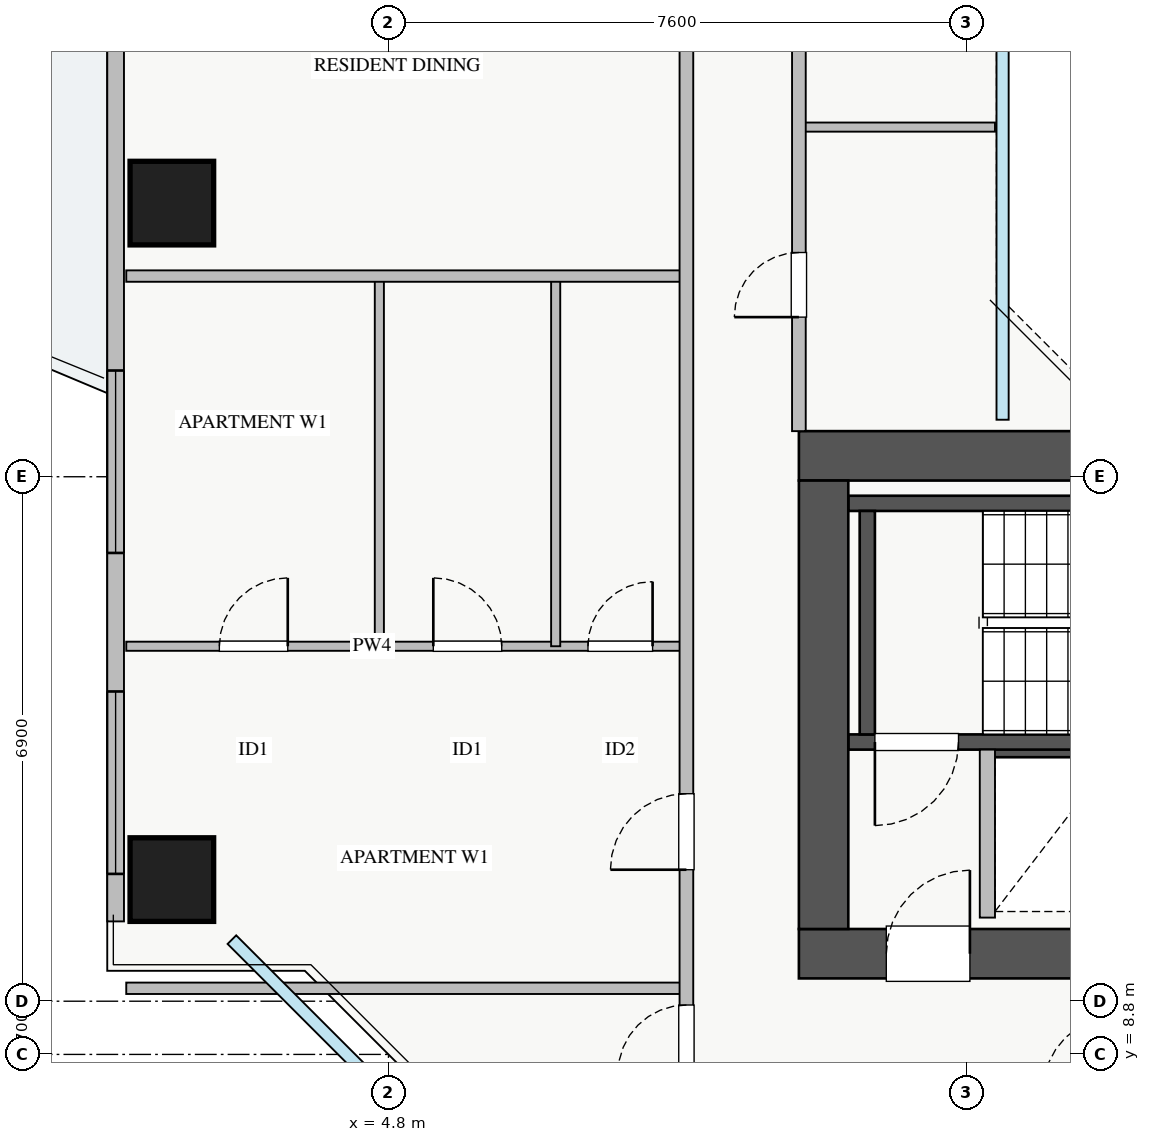
"""IFC4 building model, lengths in metres.
Left out: names, types, materials, properties, quantities, classifications, styles, units other than length and angle.
Written with IfcOpenShell. Run it as: python <this file> out.ifc"""

import sys

from ifc_helpers import new_model, si_unit, direction, frame, frame_2d, origin, origin_2d, place, context, subcontext, project, spatial, rectangle, extrude, source, transform, mapped, element, fill, save


model = new_model("IFC4")
c1 = context("Model", 3, precision=1e-05, world=origin(), true_north=direction((0.0, 1.0)))
c2 = subcontext(c1, "Body", "Model", "MODEL_VIEW")
j1 = project(units=[si_unit("LENGTHUNIT", "METRE"), si_unit("PLANEANGLEUNIT", "RADIAN")], contexts=[c1])
p1 = place(None, origin())
s1 = spatial("IfcSite", under=j1, at=p1, CompositionType="ELEMENT")
p2 = place(p1, origin())
s2 = spatial("IfcBuilding", under=s1, at=p2, CompositionType="ELEMENT")
p3 = place(p2, frame((0.0, 0.0, 123.0)))
s3 = spatial("IfcBuildingStorey", under=s2, at=p3, CompositionType="ELEMENT", Elevation=123.0)
p4 = place(p3, frame((12.68, 12.8, 0.0), z_axis=(0.0, 0.0, 1.0), x_axis=(1.0, 0.0, 0.0)))
e1 = element("IfcWall", 1, at=p4, inside=s3, PredefinedType="SHEAR", context=c2, shape_type="SweptSolid", body=[
    extrude(rectangle(XDim=1.94, YDim=0.18, at=frame_2d((0.97, 0.0))), origin(), (0.0, 0.0, 1.0), 3.07),
])
p5 = place(p3, frame((10.85, 12.91, 0.0), z_axis=(0.0, 0.0, 1.0), x_axis=(1.0, 0.0, 0.0)))
e2 = element("IfcWall", 2, at=p5, inside=s3, PredefinedType="SHEAR", context=c2, shape_type="SweptSolid", body=[
    extrude(rectangle(XDim=7.3, YDim=0.2, at=frame_2d((3.65, 0.0))), origin(), (0.0, 0.0, 1.0), 3.25),
])
p6 = place(p5, frame((0.35, 0.0, 0.0)))
e3 = element("IfcOpeningElement", 3, at=p6, cuts=e2, PredefinedType="OPENING", context=c2, shape_type="SweptSolid", body=[
    extrude(rectangle(XDim=1.1, YDim=2.05, at=frame_2d((0.55, 1.025))), frame((0.0, 0.11, 0.0), z_axis=(0.0, -1.0, 0.0), x_axis=(1.0, 0.0, 0.0)), (0.0, 0.0, 1.0), 0.22),
])
p7 = place(p3, frame((10.85, 16.05, 0.0), z_axis=(0.0, 0.0, 1.0), x_axis=(1.0, 0.0, 0.0)))
e4 = element("IfcWall", 4, at=p7, inside=s3, PredefinedType="SHEAR", context=c2, shape_type="SweptSolid", body=[
    extrude(rectangle(XDim=7.3, YDim=0.2, at=frame_2d((3.65, 0.0))), origin(), (0.0, 0.0, 1.0), 3.25),
])
p8 = place(p3, frame((11.1, 13.01, 0.0), z_axis=(0.0, 0.0, 1.0), x_axis=(0.0, 1.0, 0.0)))
e5 = element("IfcWall", 5, at=p8, inside=s3, PredefinedType="SHEAR", context=c2, shape_type="SweptSolid", body=[
    extrude(rectangle(XDim=2.94, YDim=0.2, at=frame_2d((1.47, 0.0))), origin(), (0.0, 0.0, 1.0), 3.25),
])
p9 = place(p3, frame((10.2, 10.125, 0.0), z_axis=(0.0, 0.0, 1.0), x_axis=(1.0, 0.0, 0.0)))
e6 = element("IfcWall", 6, at=p9, inside=s3, PredefinedType="SHEAR", context=c2, shape_type="SweptSolid", body=[
    extrude(rectangle(XDim=17.6, YDim=0.65, at=frame_2d((8.8, 0.0))), origin(), (0.0, 0.0, 1.0), 3.25),
])
p10 = place(p9, frame((1.15, 0.0, 0.0)))
e7 = element("IfcOpeningElement", 7, at=p10, cuts=e6, PredefinedType="OPENING", context=c2, shape_type="SweptSolid", body=[
    extrude(rectangle(XDim=1.1, YDim=2.05, at=frame_2d((0.55, 1.025))), frame((0.0, 0.335, 0.0), z_axis=(0.0, -1.0, 0.0), x_axis=(1.0, 0.0, 0.0)), (0.0, 0.0, 1.0), 0.67),
])
p11 = place(p9, frame((8.3, 0.0, 0.0)))
e8 = element("IfcOpeningElement", 8, at=p11, cuts=e6, PredefinedType="OPENING", context=c2, shape_type="SweptSolid", body=[
    extrude(rectangle(XDim=1.1, YDim=2.05, at=frame_2d((0.55, 1.025))), frame((0.0, 0.335, 0.0), z_axis=(0.0, -1.0, 0.0), x_axis=(1.0, 0.0, 0.0)), (0.0, 0.0, 1.0), 0.67),
])
p12 = place(p9, frame((4.9, 0.0, 0.0)))
e9 = element("IfcOpeningElement", 9, at=p12, cuts=e6, PredefinedType="OPENING", context=c2, shape_type="SweptSolid", body=[
    extrude(rectangle(XDim=1.1, YDim=2.05, at=frame_2d((0.55, 1.025))), frame((0.0, 0.335, 0.0), z_axis=(0.0, -1.0, 0.0), x_axis=(1.0, 0.0, 0.0)), (0.0, 0.0, 1.0), 0.67),
])
p13 = place(p9, frame((14.74, 0.0, 0.0)))
e10 = element("IfcOpeningElement", 10, at=p13, cuts=e6, PredefinedType="OPENING", context=c2, shape_type="SweptSolid", body=[
    extrude(rectangle(XDim=1.0, YDim=2.05, at=frame_2d((0.5, 1.025))), frame((0.0, 0.335, 0.0), z_axis=(0.0, -1.0, 0.0), x_axis=(1.0, 0.0, 0.0)), (0.0, 0.0, 1.0), 0.67),
])
p14 = place(p9, frame((10.155, 0.0, 0.0)))
e11 = element("IfcOpeningElement", 11, at=p14, cuts=e6, PredefinedType="OPENING", context=c2, shape_type="SweptSolid", body=[
    extrude(rectangle(XDim=1.0, YDim=2.05, at=frame_2d((0.5, 1.025))), frame((0.0, 0.335, 0.0), z_axis=(0.0, -1.0, 0.0), x_axis=(1.0, 0.0, 0.0)), (0.0, 0.0, 1.0), 0.67),
])
p15 = place(p9, frame((11.87, 0.0, 0.0)))
e12 = element("IfcOpeningElement", 12, at=p15, cuts=e6, PredefinedType="OPENING", context=c2, shape_type="SweptSolid", body=[
    extrude(rectangle(XDim=1.0, YDim=2.05, at=frame_2d((0.5, 1.025))), frame((0.0, 0.335, 0.0), z_axis=(0.0, -1.0, 0.0), x_axis=(1.0, 0.0, 0.0)), (0.0, 0.0, 1.0), 0.67),
])
p16 = place(p9, frame((13.46, 0.0, 0.0)))
e13 = element("IfcOpeningElement", 13, at=p16, cuts=e6, PredefinedType="OPENING", context=c2, shape_type="SweptSolid", body=[
    extrude(rectangle(XDim=1.0, YDim=2.05, at=frame_2d((0.5, 1.025))), frame((0.0, 0.335, 0.0), z_axis=(0.0, -1.0, 0.0), x_axis=(1.0, 0.0, 0.0)), (0.0, 0.0, 1.0), 0.67),
])
p17 = place(p3, frame((10.2, 16.675, 0.0), z_axis=(0.0, 0.0, 1.0), x_axis=(1.0, 0.0, 0.0)))
e14 = element("IfcWall", 14, at=p17, inside=s3, PredefinedType="SHEAR", context=c2, shape_type="SweptSolid", body=[
    extrude(rectangle(XDim=17.6, YDim=0.65, at=frame_2d((8.8, 0.0))), origin(), (0.0, 0.0, 1.0), 3.25),
])
p18 = place(p3, frame((10.525, 10.45, 0.0), z_axis=(0.0, 0.0, 1.0), x_axis=(0.0, 1.0, 0.0)))
e15 = element("IfcWall", 15, at=p18, inside=s3, PredefinedType="SHEAR", context=c2, shape_type="SweptSolid", body=[
    extrude(rectangle(XDim=5.9, YDim=0.65, at=frame_2d((2.95, 0.0))), origin(), (0.0, 0.0, 1.0), 3.25),
])
m1 = source(origin(), c2, "Body", "SweptSolid", [
    extrude(rectangle(XDim=1.1, YDim=1.1, at=origin_2d()), origin(), (0.0, 0.0, 1.0), 3.25),
])
for number, where, z_axis, x_axis in (
    (16, (1.95, 20.0, 0.0), (0.0, 0.0, 1.0), (1.0, 0.0, 0.0)),
    (17, (1.95, 11.1, 0.0), (0.0, 0.0, 1.0), (1.0, 0.0, 0.0)),
):
    element("IfcColumn", number, at=place(p3, frame(where, z_axis=z_axis, x_axis=x_axis)), inside=s3, PredefinedType="COLUMN", context=c2, shape_type="MappedRepresentation", body=[
        mapped(m1, transform((0.0, 0.0, 0.0), x_axis=(1.0, 0.0, 0.0), y_axis=(0.0, 1.0, 0.0), z_axis=(0.0, 0.0, 1.0), scale=1.0)),
    ])
p19 = place(p3, frame((1.21, 10.55, 0.0), z_axis=(0.0, 0.0, 1.0), x_axis=(0.0, 1.0, 0.0)))
e18 = element("IfcWall", 18, at=p19, inside=s3, PredefinedType="STANDARD", context=c2, shape_type="SweptSolid", body=[
    extrude(rectangle(XDim=24.9, YDim=0.22, at=frame_2d((12.45, 0.0))), origin(), (0.0, 0.0, 1.0), 2.61),
])
p20 = place(p19, frame((13.3, 0.0, 0.0)))
e19 = element("IfcOpeningElement", 19, at=p20, cuts=e18, PredefinedType="OPENING", context=c2, shape_type="SweptSolid", body=[
    extrude(rectangle(XDim=1.2, YDim=2.1, at=frame_2d((0.6, 1.05))), frame((0.0, 0.12, 0.0), z_axis=(0.0, -1.0, 0.0), x_axis=(1.0, 0.0, 0.0)), (0.0, 0.0, 1.0), 0.24),
])
p21 = place(p19, frame((0.625, 0.0, 0.9)))
e20 = element("IfcOpeningElement", 20, at=p21, cuts=e18, PredefinedType="OPENING", context=c2, shape_type="SweptSolid", body=[
    extrude(rectangle(XDim=2.4, YDim=1.5, at=frame_2d((1.2, 0.75))), frame((0.0, 0.12, 0.0), z_axis=(0.0, -1.0, 0.0), x_axis=(1.0, 0.0, 0.0)), (0.0, 0.0, 1.0), 0.24),
])
p22 = place(p19, frame((21.82, 0.0, 0.9)))
e21 = element("IfcOpeningElement", 21, at=p22, cuts=e18, PredefinedType="OPENING", context=c2, shape_type="SweptSolid", body=[
    extrude(rectangle(XDim=2.1, YDim=1.5, at=frame_2d((1.05, 0.75))), frame((0.0, 0.12, 0.0), z_axis=(0.0, -1.0, 0.0), x_axis=(1.0, 0.0, 0.0)), (0.0, 0.0, 1.0), 0.24),
])
p23 = place(p19, frame((4.847, 0.0, 0.9)))
e22 = element("IfcOpeningElement", 22, at=p23, cuts=e18, PredefinedType="OPENING", context=c2, shape_type="SweptSolid", body=[
    extrude(rectangle(XDim=2.4, YDim=1.5, at=frame_2d((1.2, 0.75))), frame((0.0, 0.12, 0.0), z_axis=(0.0, -1.0, 0.0), x_axis=(1.0, 0.0, 0.0)), (0.0, 0.0, 1.0), 0.24),
])
p24 = place(p19, frame((16.895, 0.0, 0.9)))
e23 = element("IfcOpeningElement", 23, at=p24, cuts=e18, PredefinedType="OPENING", context=c2, shape_type="SweptSolid", body=[
    extrude(rectangle(XDim=0.9, YDim=1.2, at=frame_2d((0.45, 0.6))), frame((0.0, 0.12, 0.0), z_axis=(0.0, -1.0, 0.0), x_axis=(1.0, 0.0, 0.0)), (0.0, 0.0, 1.0), 0.24),
])
p25 = place(p3, frame((12.68, 10.6, 0.0), z_axis=(0.0, 0.0, 1.0), x_axis=(0.0, 1.0, 0.0)))
e24 = element("IfcWall", 24, at=p25, inside=s3, PredefinedType="PARTITIONING", context=c2, shape_type="SweptSolid", body=[
    extrude(rectangle(XDim=2.21, YDim=0.2, at=frame_2d((1.105, 0.0))), origin(), (0.0, 0.0, 1.0), 3.07),
])
p26 = place(p3, frame((1.35, 9.67, 0.0), z_axis=(0.0, 0.0, 1.0), x_axis=(1.0, 0.0, 0.0)))
e25 = element("IfcWall", 25, at=p26, inside=s3, PredefinedType="PARTITIONING", context=c2, shape_type="SweptSolid", body=[
    extrude(rectangle(XDim=7.37, YDim=0.15, at=frame_2d((3.685, 0.0))), origin(), (0.0, 0.0, 1.0), 3.07),
])
p27 = place(p3, frame((1.35, 14.17, 0.0), z_axis=(0.0, 0.0, 1.0), x_axis=(1.0, 0.0, 0.0)))
e26 = element("IfcWall", 26, at=p27, inside=s3, PredefinedType="PLUMBINGWALL", context=c2, shape_type="SweptSolid", body=[
    extrude(rectangle(XDim=7.37, YDim=0.12, at=frame_2d((3.685, 0.0))), origin(), (0.0, 0.0, 1.0), 3.07),
])
p28 = place(p27, frame((1.225, 0.0, 0.0)))
e27 = element("IfcOpeningElement", 27, at=p28, cuts=e26, PredefinedType="OPENING", context=c2, shape_type="SweptSolid", body=[
    extrude(rectangle(XDim=0.9, YDim=2.05, at=frame_2d((0.45, 1.025))), frame((0.0, 0.07, 0.0), z_axis=(0.0, -1.0, 0.0), x_axis=(1.0, 0.0, 0.0)), (0.0, 0.0, 1.0), 0.14),
])
p29 = place(p27, frame((4.04, 0.0, 0.0)))
e28 = element("IfcOpeningElement", 28, at=p29, cuts=e26, PredefinedType="OPENING", context=c2, shape_type="SweptSolid", body=[
    extrude(rectangle(XDim=0.9, YDim=2.05, at=frame_2d((0.45, 1.025))), frame((0.0, 0.07, 0.0), z_axis=(0.0, -1.0, 0.0), x_axis=(1.0, 0.0, 0.0)), (0.0, 0.0, 1.0), 0.14),
])
p30 = place(p27, frame((6.075, 0.0, 0.0)))
e29 = element("IfcOpeningElement", 29, at=p30, cuts=e26, PredefinedType="OPENING", context=c2, shape_type="SweptSolid", body=[
    extrude(rectangle(XDim=0.85, YDim=2.05, at=frame_2d((0.425, 1.025))), frame((0.0, 0.07, 0.0), z_axis=(0.0, -1.0, 0.0), x_axis=(1.0, 0.0, 0.0)), (0.0, 0.0, 1.0), 0.14),
])
for number, where, z_axis, x_axis in (
    (30, (4.68, 14.17, 0.0), (0.0, 0.0, 1.0), (0.0, 1.0, 0.0)),
    (31, (7.0, 14.17, 0.0), (0.0, 0.0, 1.0), (0.0, 1.0, 0.0)),
):
    element("IfcWall", number, at=place(p3, frame(where, z_axis=z_axis, x_axis=x_axis)), inside=s3, PredefinedType="PLUMBINGWALL", context=c2, shape_type="SweptSolid", body=[
        extrude(rectangle(XDim=4.87, YDim=0.12, at=frame_2d((2.435, 0.0))), origin(), (0.0, 0.0, 1.0), 3.07),
    ])
p31 = place(p3, frame((1.35, 19.04, 0.0), z_axis=(0.0, 0.0, 1.0), x_axis=(1.0, 0.0, 0.0)))
e32 = element("IfcWall", 32, at=p31, inside=s3, PredefinedType="PARTITIONING", context=c2, shape_type="SweptSolid", body=[
    extrude(rectangle(XDim=7.37, YDim=0.15, at=frame_2d((3.685, 0.0))), origin(), (0.0, 0.0, 1.0), 3.07),
])
p32 = place(p3, frame((8.72, 8.31, 0.0), z_axis=(0.0, 0.0, 1.0), x_axis=(0.0, 1.0, 0.0)))
e33 = element("IfcWall", 33, at=p32, inside=s3, PredefinedType="PARTITIONING", context=c2, shape_type="SweptSolid", body=[
    extrude(rectangle(XDim=29.37, YDim=0.18, at=frame_2d((14.685, 0.0))), origin(), (0.0, 0.0, 1.0), 3.07),
])
p33 = place(p32, frame((28.06, 0.0, 0.0)))
e34 = element("IfcOpeningElement", 34, at=p33, cuts=e33, PredefinedType="OPENING", context=c2, shape_type="SweptSolid", body=[
    extrude(rectangle(XDim=0.9, YDim=2.05, at=frame_2d((0.45, 1.025))), frame((0.0, 0.1, 0.0), z_axis=(0.0, -1.0, 0.0), x_axis=(1.0, 0.0, 0.0)), (0.0, 0.0, 1.0), 0.2),
])
p34 = place(p32, frame((0.24, 0.0, 0.0)))
e35 = element("IfcOpeningElement", 35, at=p34, cuts=e33, PredefinedType="OPENING", context=c2, shape_type="SweptSolid", body=[
    extrude(rectangle(XDim=0.9, YDim=2.05, at=frame_2d((0.45, 1.025))), frame((0.0, 0.1, 0.0), z_axis=(0.0, -1.0, 0.0), x_axis=(1.0, 0.0, 0.0)), (0.0, 0.0, 1.0), 0.2),
])
p35 = place(p32, frame((2.92, 0.0, 0.0)))
e36 = element("IfcOpeningElement", 36, at=p35, cuts=e33, PredefinedType="OPENING", context=c2, shape_type="SweptSolid", body=[
    extrude(rectangle(XDim=1.0, YDim=2.05, at=frame_2d((0.5, 1.025))), frame((0.0, 0.1, 0.0), z_axis=(0.0, -1.0, 0.0), x_axis=(1.0, 0.0, 0.0)), (0.0, 0.0, 1.0), 0.2),
])
p36 = place(p32, frame((14.315, 0.0, 0.0)))
e37 = element("IfcOpeningElement", 37, at=p36, cuts=e33, PredefinedType="OPENING", context=c2, shape_type="SweptSolid", body=[
    extrude(rectangle(XDim=1.0, YDim=2.05, at=frame_2d((0.5, 1.025))), frame((0.0, 0.1, 0.0), z_axis=(0.0, -1.0, 0.0), x_axis=(1.0, 0.0, 0.0)), (0.0, 0.0, 1.0), 0.2),
])
p37 = place(p32, frame((20.315, 0.0, 0.0)))
e38 = element("IfcOpeningElement", 38, at=p37, cuts=e33, PredefinedType="OPENING", context=c2, shape_type="SweptSolid", body=[
    extrude(rectangle(XDim=1.0, YDim=2.05, at=frame_2d((0.5, 1.025))), frame((0.0, 0.1, 0.0), z_axis=(0.0, -1.0, 0.0), x_axis=(1.0, 0.0, 0.0)), (0.0, 0.0, 1.0), 0.2),
])
p38 = place(p3, frame((10.2, 21.0, 0.0), z_axis=(0.0, 0.0, 1.0), x_axis=(1.0, 0.0, 0.0)))
e39 = element("IfcWall", 39, at=p38, inside=s3, PredefinedType="PLUMBINGWALL", context=c2, shape_type="SweptSolid", body=[
    extrude(rectangle(XDim=2.58, YDim=0.12, at=frame_2d((1.29, 0.0))), origin(), (0.0, 0.0, 1.0), 3.07),
])
p39 = place(p3, frame((10.2, 17.0, 0.0), z_axis=(0.0, 0.0, 1.0), x_axis=(0.0, 1.0, 0.0)))
e40 = element("IfcWall", 40, at=p39, inside=s3, PredefinedType="PARTITIONING", context=c2, shape_type="SweptSolid", body=[
    extrude(rectangle(XDim=12.0, YDim=0.18, at=frame_2d((6.0, 0.0))), origin(), (0.0, 0.0, 1.0), 3.07),
])
p40 = place(p39, frame((1.5, 0.0, 0.0)))
e41 = element("IfcOpeningElement", 41, at=p40, cuts=e40, PredefinedType="OPENING", context=c2, shape_type="SweptSolid", body=[
    extrude(rectangle(XDim=0.85, YDim=2.05, at=frame_2d((0.425, 1.025))), frame((0.0, 0.1, 0.0), z_axis=(0.0, -1.0, 0.0), x_axis=(1.0, 0.0, 0.0)), (0.0, 0.0, 1.0), 0.2),
])
p41 = place(p39, frame((6.5, 0.0, 0.0)))
e42 = element("IfcOpeningElement", 42, at=p41, cuts=e40, PredefinedType="OPENING", context=c2, shape_type="SweptSolid", body=[
    extrude(rectangle(XDim=1.0, YDim=2.05, at=frame_2d((0.5, 1.025))), frame((0.0, 0.1, 0.0), z_axis=(0.0, -1.0, 0.0), x_axis=(1.0, 0.0, 0.0)), (0.0, 0.0, 1.0), 0.2),
])
m2 = source(origin(), c2, "Body", "SweptSolid", [
    extrude(rectangle(XDim=2.4, YDim=1.5, at=frame_2d((1.2, 0.75))), frame((0.0, 0.03, 0.0), z_axis=(0.0, -1.0, 0.0), x_axis=(1.0, 0.0, 0.0)), (0.0, 0.0, 1.0), 0.06),
])
p42 = place(p21, origin())
e43 = element("IfcWindow", 43, at=p42, inside=s3, PartitioningType="TRIPLE_PANEL_VERTICAL", PredefinedType="WINDOW", context=c2, shape_type="MappedRepresentation", body=[
    mapped(m2, transform((0.0, 0.0, 0.0), x_axis=(1.0, 0.0, 0.0), y_axis=(0.0, 1.0, 0.0), z_axis=(0.0, 0.0, 1.0), scale=1.0)),
])
fill(e20, e43)
m3 = source(origin(), c2, "Body", "SweptSolid", [
    extrude(rectangle(XDim=1.1, YDim=2.05, at=frame_2d((0.55, 1.025))), frame((0.0, 0.025, 0.0), z_axis=(0.0, -1.0, 0.0), x_axis=(1.0, 0.0, 0.0)), (0.0, 0.0, 1.0), 0.05),
])
p43 = place(p10, origin())
e44 = element("IfcDoor", 44, at=p43, inside=s3, OperationType="SINGLE_SWING_RIGHT", PredefinedType="DOOR", context=c2, shape_type="MappedRepresentation", body=[
    mapped(m3, transform((0.0, 0.0, 0.0), x_axis=(1.0, 0.0, 0.0), y_axis=(0.0, 1.0, 0.0), z_axis=(0.0, 0.0, 1.0), scale=1.0)),
])
fill(e7, e44)
p44 = place(p6, frame((1.1, 0.0, 0.0), z_axis=(0.0, 0.0, 1.0), x_axis=(-1.0, 0.0, 0.0)))
e45 = element("IfcDoor", 45, at=p44, inside=s3, OperationType="SINGLE_SWING_LEFT", PredefinedType="DOOR", context=c2, shape_type="MappedRepresentation", body=[
    mapped(m3, transform((0.0, 0.0, 0.0), x_axis=(1.0, 0.0, 0.0), y_axis=(0.0, 1.0, 0.0), z_axis=(0.0, 0.0, 1.0), scale=1.0)),
])
fill(e3, e45)
m4 = source(origin(), c2, "Body", "SweptSolid", [
    extrude(rectangle(XDim=0.9, YDim=2.05, at=frame_2d((0.45, 1.025))), frame((0.0, 0.025, 0.0), z_axis=(0.0, -1.0, 0.0), x_axis=(1.0, 0.0, 0.0)), (0.0, 0.0, 1.0), 0.05),
])
p45 = place(p28, origin())
e46 = element("IfcDoor", 46, at=p45, inside=s3, OperationType="SINGLE_SWING_RIGHT", PredefinedType="DOOR", context=c2, shape_type="MappedRepresentation", body=[
    mapped(m4, transform((0.0, 0.0, 0.0), x_axis=(1.0, 0.0, 0.0), y_axis=(0.0, 1.0, 0.0), z_axis=(0.0, 0.0, 1.0), scale=1.0)),
])
fill(e27, e46)
p46 = place(p29, origin())
e47 = element("IfcDoor", 47, at=p46, inside=s3, OperationType="SINGLE_SWING_LEFT", PredefinedType="DOOR", context=c2, shape_type="MappedRepresentation", body=[
    mapped(m4, transform((0.0, 0.0, 0.0), x_axis=(1.0, 0.0, 0.0), y_axis=(0.0, 1.0, 0.0), z_axis=(0.0, 0.0, 1.0), scale=1.0)),
])
fill(e28, e47)
m5 = source(origin(), c2, "Body", "SweptSolid", [
    extrude(rectangle(XDim=0.85, YDim=2.05, at=frame_2d((0.425, 1.025))), frame((0.0, 0.025, 0.0), z_axis=(0.0, -1.0, 0.0), x_axis=(1.0, 0.0, 0.0)), (0.0, 0.0, 1.0), 0.05),
])
p47 = place(p30, origin())
e48 = element("IfcDoor", 48, at=p47, inside=s3, OperationType="SINGLE_SWING_RIGHT", PredefinedType="DOOR", context=c2, shape_type="MappedRepresentation", body=[
    mapped(m5, transform((0.0, 0.0, 0.0), x_axis=(1.0, 0.0, 0.0), y_axis=(0.0, 1.0, 0.0), z_axis=(0.0, 0.0, 1.0), scale=1.0)),
])
fill(e29, e48)
p48 = place(p34, origin())
e49 = element("IfcDoor", 49, at=p48, inside=s3, OperationType="SINGLE_SWING_LEFT", PredefinedType="DOOR", context=c2, shape_type="MappedRepresentation", body=[
    mapped(m4, transform((0.0, 0.0, 0.0), x_axis=(1.0, 0.0, 0.0), y_axis=(0.0, 1.0, 0.0), z_axis=(0.0, 0.0, 1.0), scale=1.0)),
])
fill(e35, e49)
m6 = source(origin(), c2, "Body", "SweptSolid", [
    extrude(rectangle(XDim=1.0, YDim=2.05, at=frame_2d((0.5, 1.025))), frame((0.0, 0.025, 0.0), z_axis=(0.0, -1.0, 0.0), x_axis=(1.0, 0.0, 0.0)), (0.0, 0.0, 1.0), 0.05),
])
p49 = place(p35, origin())
e50 = element("IfcDoor", 50, at=p49, inside=s3, OperationType="SINGLE_SWING_LEFT", PredefinedType="DOOR", context=c2, shape_type="MappedRepresentation", body=[
    mapped(m6, transform((0.0, 0.0, 0.0), x_axis=(1.0, 0.0, 0.0), y_axis=(0.0, 1.0, 0.0), z_axis=(0.0, 0.0, 1.0), scale=1.0)),
])
fill(e36, e50)
p50 = place(p40, origin())
e51 = element("IfcDoor", 51, at=p50, inside=s3, OperationType="SINGLE_SWING_LEFT", PredefinedType="DOOR", context=c2, shape_type="MappedRepresentation", body=[
    mapped(m5, transform((0.0, 0.0, 0.0), x_axis=(1.0, 0.0, 0.0), y_axis=(0.0, 1.0, 0.0), z_axis=(0.0, 0.0, 1.0), scale=1.0)),
])
fill(e41, e51)
p51 = place(p23, origin())
e52 = element("IfcWindow", 52, at=p51, inside=s3, PartitioningType="TRIPLE_PANEL_VERTICAL", PredefinedType="WINDOW", context=c2, shape_type="MappedRepresentation", body=[
    mapped(m2, transform((0.0, 0.0, 0.0), x_axis=(1.0, 0.0, 0.0), y_axis=(0.0, 1.0, 0.0), z_axis=(0.0, 0.0, 1.0), scale=1.0)),
])
fill(e22, e52)
save(model, sys.argv[1])
